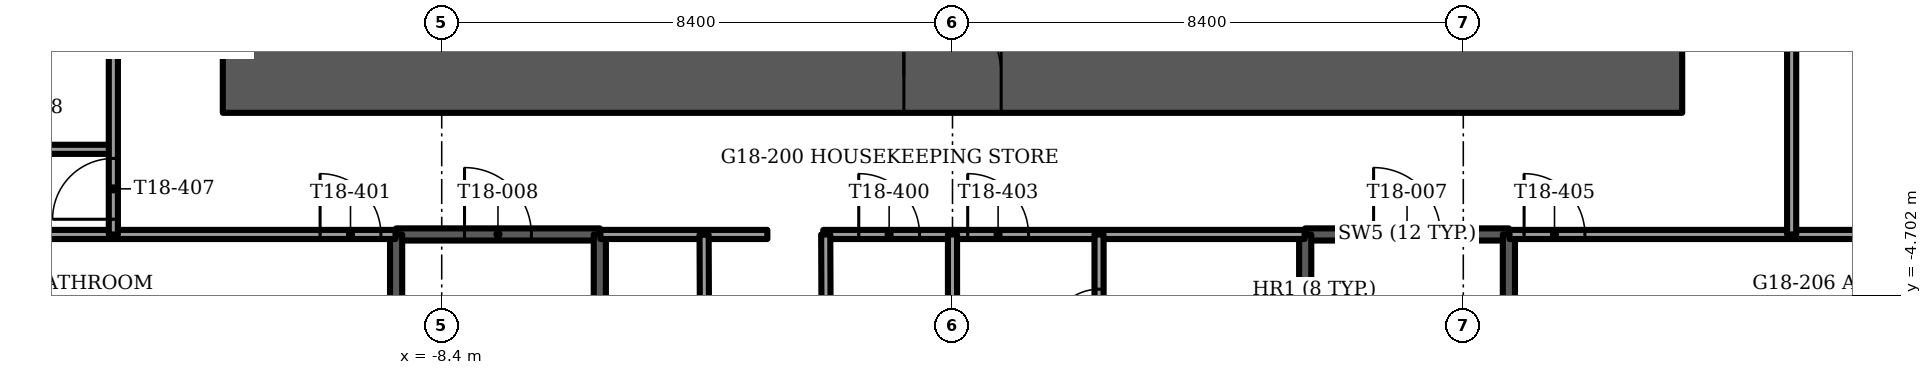
"""IFC4 building model, lengths in metres.
Left out: names, types, materials, properties, quantities, classifications, styles, units other than length and angle.
Written with IfcOpenShell. Run it as: python <this file> out.ifc"""

import sys

from ifc_helpers import new_model, si_unit, direction, frame, frame_2d, origin, place, context, subcontext, project, spatial, rectangle, extrude, element, fill, save


model = new_model("IFC4")
c1 = context("Model", 3, precision=1e-05, world=origin(), true_north=direction((0.0, 1.0)))
c2 = subcontext(c1, "Body", "Model", "MODEL_VIEW")
j1 = project(units=[si_unit("LENGTHUNIT", "METRE"), si_unit("PLANEANGLEUNIT", "RADIAN")], contexts=[c1])
p1 = place(None, origin())
s1 = spatial("IfcSite", under=j1, at=p1, CompositionType="ELEMENT")
p2 = place(p1, origin())
s2 = spatial("IfcBuilding", under=s1, at=p2, CompositionType="ELEMENT")
p3 = place(p2, frame((0.0, 0.0, 73.0)))
s3 = spatial("IfcBuildingStorey", under=s2, at=p3, CompositionType="ELEMENT", Elevation=73.0)
p4 = place(p3, frame((-12.0, -1.1, -0.3), z_axis=(0.0, 0.0, 1.0), x_axis=(1.0, 0.0, 0.0)))
e1 = element("IfcWall", 1, at=p4, inside=s3, PredefinedType="SHEAR", context=c2, shape_type="SweptSolid", body=[
    extrude(rectangle(XDim=24.0, YDim=1.2, at=frame_2d((12.0, 0.0))), origin(), (0.0, 0.0, 1.0), 3.75),
])
p5 = place(p4, frame((11.2, 0.0, 0.0)))
e2 = element("IfcOpeningElement", 2, at=p5, cuts=e1, PredefinedType="OPENING", context=c2, shape_type="SweptSolid", body=[
    extrude(rectangle(XDim=1.6, YDim=2.1, at=frame_2d((0.8, 1.05))), frame((0.0, 0.6, 0.0), z_axis=(0.0, -1.0, 0.0), x_axis=(1.0, 0.0, 0.0)), (0.0, 0.0, 1.0), 1.2),
])
p6 = place(p3, frame((-20.401, -1.514, 0.0), z_axis=(0.0, 0.0, 1.0), x_axis=(0.499991453095, -0.866030338286, 0.0)))
e3 = element("IfcWall", 3, at=p6, inside=s3, PredefinedType="SOLIDWALL", context=c2, shape_type="SweptSolid", body=[
    extrude(rectangle(XDim=11.444, YDim=0.15, at=frame_2d((5.722, 0.0))), origin(), (0.0, 0.0, 1.0), 3.45),
])
p7 = place(p6, frame((0.789, 0.0, 0.15)))
e4 = element("IfcOpeningElement", 4, at=p7, cuts=e3, PredefinedType="OPENING", context=c2, shape_type="SweptSolid", body=[
    extrude(rectangle(XDim=0.9, YDim=2.2, at=frame_2d((0.45, 1.1))), frame((0.0, 0.075, 0.0), z_axis=(0.0, -1.0, 0.0), x_axis=(1.0, 0.0, 0.0)), (0.0, 0.0, 1.0), 0.15),
])
p8 = place(p6, frame((2.889, 0.0, 0.15)))
e5 = element("IfcOpeningElement", 5, at=p8, cuts=e3, PredefinedType="OPENING", context=c2, shape_type="SweptSolid", body=[
    extrude(rectangle(XDim=1.5, YDim=2.2, at=frame_2d((0.75, 1.1))), frame((0.0, 0.075, 0.0), z_axis=(0.0, -1.0, 0.0), x_axis=(1.0, 0.0, 0.0)), (0.0, 0.0, 1.0), 0.15),
])
p9 = place(p6, frame((6.312, 0.0, 0.15)))
e6 = element("IfcOpeningElement", 6, at=p9, cuts=e3, PredefinedType="OPENING", context=c2, shape_type="SweptSolid", body=[
    extrude(rectangle(XDim=1.8, YDim=2.2, at=frame_2d((0.9, 1.1))), frame((0.0, 0.075, 0.0), z_axis=(0.0, -1.0, 0.0), x_axis=(1.0, 0.0, 0.0)), (0.0, 0.0, 1.0), 0.15),
])
p10 = place(p3, frame((14.679, -11.425, 0.0), z_axis=(0.0, 0.0, 1.0), x_axis=(0.499991453095, 0.866030338286, 0.0)))
e7 = element("IfcWall", 7, at=p10, inside=s3, PredefinedType="SOLIDWALL", context=c2, shape_type="SweptSolid", body=[
    extrude(rectangle(XDim=11.444, YDim=0.15, at=frame_2d((5.722, 0.0))), origin(), (0.0, 0.0, 1.0), 3.45),
])
p11 = place(p10, frame((3.632, 0.0, 0.15)))
e8 = element("IfcOpeningElement", 8, at=p11, cuts=e7, PredefinedType="OPENING", context=c2, shape_type="SweptSolid", body=[
    extrude(rectangle(XDim=1.5, YDim=2.2, at=frame_2d((0.75, 1.1))), frame((0.0, 0.075, 0.0), z_axis=(0.0, -1.0, 0.0), x_axis=(1.0, 0.0, 0.0)), (0.0, 0.0, 1.0), 0.15),
])
p12 = place(p10, frame((7.055, 0.0, 0.15)))
e9 = element("IfcOpeningElement", 9, at=p12, cuts=e7, PredefinedType="OPENING", context=c2, shape_type="SweptSolid", body=[
    extrude(rectangle(XDim=0.9, YDim=2.2, at=frame_2d((0.45, 1.1))), frame((0.0, 0.075, 0.0), z_axis=(0.0, -1.0, 0.0), x_axis=(1.0, 0.0, 0.0)), (0.0, 0.0, 1.0), 0.15),
])
p13 = place(p3, frame((5.8, -3.7, -0.3), z_axis=(0.0, 0.0, 1.0), x_axis=(1.0, 0.0, 0.0)))
e10 = element("IfcWall", 10, at=p13, inside=s3, PredefinedType="SOLIDWALL", context=c2, shape_type="SweptSolid", body=[
    extrude(rectangle(XDim=3.35, YDim=0.2, at=frame_2d((1.675, 0.0))), origin(), (0.0, 0.0, 1.0), 3.75),
])
p14 = place(p13, frame((1.125, 0.0, 0.0)))
e11 = element("IfcOpeningElement", 11, at=p14, cuts=e10, PredefinedType="OPENING", context=c2, shape_type="SweptSolid", body=[
    extrude(rectangle(XDim=1.1, YDim=2.1, at=frame_2d((0.55, 1.05))), frame((0.0, 0.1, 0.0), z_axis=(0.0, -1.0, 0.0), x_axis=(1.0, 0.0, 0.0)), (0.0, 0.0, 1.0), 0.2),
])
for number, where, z_axis, x_axis in (
    (12, (5.8, -3.7, -0.3), (0.0, 0.0, 1.0), (0.0, -1.0, 0.0)),
    (13, (9.15, -3.7, -0.3), (0.0, 0.0, 1.0), (0.0, -1.0, 0.0)),
):
    element("IfcWall", number, at=place(p3, frame(where, z_axis=z_axis, x_axis=x_axis)), inside=s3, PredefinedType="SOLIDWALL", context=c2, shape_type="SweptSolid", body=[
        extrude(rectangle(XDim=7.7, YDim=0.2, at=frame_2d((3.85, 0.0))), origin(), (0.0, 0.0, 1.0), 3.75),
    ])
p15 = place(p3, frame((-9.15, -3.7, -0.3), z_axis=(0.0, 0.0, 1.0), x_axis=(1.0, 0.0, 0.0)))
e14 = element("IfcWall", 14, at=p15, inside=s3, PredefinedType="SOLIDWALL", context=c2, shape_type="SweptSolid", body=[
    extrude(rectangle(XDim=3.35, YDim=0.2, at=frame_2d((1.675, 0.0))), origin(), (0.0, 0.0, 1.0), 3.75),
])
p16 = place(p15, frame((1.125, 0.0, 0.0)))
e15 = element("IfcOpeningElement", 15, at=p16, cuts=e14, PredefinedType="OPENING", context=c2, shape_type="SweptSolid", body=[
    extrude(rectangle(XDim=1.1, YDim=2.1, at=frame_2d((0.55, 1.05))), frame((0.0, 0.1, 0.0), z_axis=(0.0, -1.0, 0.0), x_axis=(1.0, 0.0, 0.0)), (0.0, 0.0, 1.0), 0.2),
])
for number, where, z_axis, x_axis in (
    (16, (-9.15, -3.7, -0.3), (0.0, 0.0, 1.0), (0.0, -1.0, 0.0)),
    (17, (-5.8, -3.7, -0.3), (0.0, 0.0, 1.0), (0.0, -1.0, 0.0)),
):
    element("IfcWall", number, at=place(p3, frame(where, z_axis=z_axis, x_axis=x_axis)), inside=s3, PredefinedType="SOLIDWALL", context=c2, shape_type="SweptSolid", body=[
        extrude(rectangle(XDim=7.7, YDim=0.2, at=frame_2d((3.85, 0.0))), origin(), (0.0, 0.0, 1.0), 3.75),
    ])
p17 = place(p3, frame((-19.191, -3.7, 0.0), z_axis=(0.0, 0.0, 1.0), x_axis=(1.0, 0.0, 0.0)))
e18 = element("IfcWall", 18, at=p17, inside=s3, PredefinedType="PARTITIONING", context=c2, shape_type="SweptSolid", body=[
    extrude(rectangle(XDim=10.031, YDim=0.15, at=frame_2d((5.016, 0.0))), origin(), (0.0, 0.0, 1.0), 3.45),
])
p18 = place(p17, frame((8.791, 0.0, 0.0)))
e19 = element("IfcOpeningElement", 19, at=p18, cuts=e18, PredefinedType="OPENING", context=c2, shape_type="SweptSolid", body=[
    extrude(rectangle(XDim=1.0, YDim=2.1, at=frame_2d((0.5, 1.05))), frame((0.0, 0.075, 0.0), z_axis=(0.0, -1.0, 0.0), x_axis=(1.0, 0.0, 0.0)), (0.0, 0.0, 1.0), 0.15),
])
p19 = place(p3, frame((-5.79, -3.7, 0.0), z_axis=(0.0, 0.0, 1.0), x_axis=(1.0, 0.0, 0.0)))
e20 = element("IfcWall", 20, at=p19, inside=s3, PredefinedType="PARTITIONING", context=c2, shape_type="SweptSolid", body=[
    extrude(rectangle(XDim=2.745, YDim=0.15, at=frame_2d((1.373, 0.0))), origin(), (0.0, 0.0, 1.0), 3.45),
])
p20 = place(p3, frame((-2.125, -3.7, 0.0), z_axis=(0.0, 0.0, 1.0), x_axis=(1.0, 0.0, 0.0)))
e21 = element("IfcWall", 21, at=p20, inside=s3, PredefinedType="PARTITIONING", context=c2, shape_type="SweptSolid", body=[
    extrude(rectangle(XDim=7.915, YDim=0.15, at=frame_2d((3.958, 0.0))), origin(), (0.0, 0.0, 1.0), 3.45),
])
p21 = place(p20, frame((0.583, 0.0, 0.0)))
e22 = element("IfcOpeningElement", 22, at=p21, cuts=e21, PredefinedType="OPENING", context=c2, shape_type="SweptSolid", body=[
    extrude(rectangle(XDim=1.0, YDim=2.1, at=frame_2d((0.5, 1.05))), frame((0.0, 0.075, 0.0), z_axis=(0.0, -1.0, 0.0), x_axis=(1.0, 0.0, 0.0)), (0.0, 0.0, 1.0), 0.15),
])
p22 = place(p20, frame((2.375, 0.0, 0.0)))
e23 = element("IfcOpeningElement", 23, at=p22, cuts=e21, PredefinedType="OPENING", context=c2, shape_type="SweptSolid", body=[
    extrude(rectangle(XDim=1.0, YDim=2.1, at=frame_2d((0.5, 1.05))), frame((0.0, 0.075, 0.0), z_axis=(0.0, -1.0, 0.0), x_axis=(1.0, 0.0, 0.0)), (0.0, 0.0, 1.0), 0.15),
])
p23 = place(p3, frame((9.16, -3.7, 0.0), z_axis=(0.0, 0.0, 1.0), x_axis=(1.0, 0.0, 0.0)))
e24 = element("IfcWall", 24, at=p23, inside=s3, PredefinedType="PARTITIONING", context=c2, shape_type="SweptSolid", body=[
    extrude(rectangle(XDim=10.031, YDim=0.15, at=frame_2d((5.016, 0.0))), origin(), (0.0, 0.0, 1.0), 3.45),
])
p24 = place(p23, frame((0.24, 0.0, 0.0)))
e25 = element("IfcOpeningElement", 25, at=p24, cuts=e24, PredefinedType="OPENING", context=c2, shape_type="SweptSolid", body=[
    extrude(rectangle(XDim=1.0, YDim=2.1, at=frame_2d((0.5, 1.05))), frame((0.0, 0.075, 0.0), z_axis=(0.0, -1.0, 0.0), x_axis=(1.0, 0.0, 0.0)), (0.0, 0.0, 1.0), 0.15),
])
p25 = place(p3, frame((-16.8, -2.3, 0.0), z_axis=(0.0, 0.0, 1.0), x_axis=(1.0, 0.0, 0.0)))
e26 = element("IfcWall", 26, at=p25, inside=s3, PredefinedType="PARTITIONING", context=c2, shape_type="SweptSolid", body=[
    extrude(rectangle(XDim=3.0, YDim=0.15, at=frame_2d((1.5, 0.0))), origin(), (0.0, 0.0, 1.0), 3.45),
])
p26 = place(p25, frame((1.05, 0.0, 0.0)))
e27 = element("IfcOpeningElement", 27, at=p26, cuts=e26, PredefinedType="OPENING", context=c2, shape_type="SweptSolid", body=[
    extrude(rectangle(XDim=0.9, YDim=2.1, at=frame_2d((0.45, 1.05))), frame((0.0, 0.075, 0.0), z_axis=(0.0, -1.0, 0.0), x_axis=(1.0, 0.0, 0.0)), (0.0, 0.0, 1.0), 0.15),
])
p27 = place(p3, frame((13.8, -3.7, 0.0), z_axis=(0.0, 0.0, 1.0), x_axis=(0.0, 1.0, 0.0)))
e28 = element("IfcWall", 28, at=p27, inside=s3, PredefinedType="PARTITIONING", context=c2, shape_type="SweptSolid", body=[
    extrude(rectangle(XDim=11.415, YDim=0.15, at=frame_2d((5.708, 0.0))), origin(), (0.0, 0.0, 1.0), 3.45),
])
p28 = place(p27, frame((4.469, 0.0, 0.0)))
e29 = element("IfcOpeningElement", 29, at=p28, cuts=e28, PredefinedType="OPENING", context=c2, shape_type="SweptSolid", body=[
    extrude(rectangle(XDim=1.0, YDim=2.1, at=frame_2d((0.5, 1.05))), frame((0.0, 0.075, 0.0), z_axis=(0.0, -1.0, 0.0), x_axis=(1.0, 0.0, 0.0)), (0.0, 0.0, 1.0), 0.15),
])
p29 = place(p27, frame((9.407, 0.0, 0.0)))
e30 = element("IfcOpeningElement", 30, at=p29, cuts=e28, PredefinedType="OPENING", context=c2, shape_type="SweptSolid", body=[
    extrude(rectangle(XDim=1.0, YDim=2.1, at=frame_2d((0.5, 1.05))), frame((0.0, 0.075, 0.0), z_axis=(0.0, -1.0, 0.0), x_axis=(1.0, 0.0, 0.0)), (0.0, 0.0, 1.0), 0.15),
])
p30 = place(p3, frame((2.41, -6.3, 0.0), z_axis=(0.0, 0.0, 1.0), x_axis=(0.0, 1.0, 0.0)))
e31 = element("IfcWall", 31, at=p30, inside=s3, PredefinedType="PARTITIONING", context=c2, shape_type="SweptSolid", body=[
    extrude(rectangle(XDim=2.6, YDim=0.15, at=frame_2d((1.3, 0.0))), origin(), (0.0, 0.0, 1.0), 3.45),
])
p31 = place(p30, frame((0.9, 0.0, 0.0)))
e32 = element("IfcOpeningElement", 32, at=p31, cuts=e31, PredefinedType="OPENING", context=c2, shape_type="SweptSolid", body=[
    extrude(rectangle(XDim=0.8, YDim=2.1, at=frame_2d((0.4, 1.05))), frame((0.0, 0.075, 0.0), z_axis=(0.0, -1.0, 0.0), x_axis=(1.0, 0.0, 0.0)), (0.0, 0.0, 1.0), 0.15),
])
p32 = place(p3, frame((0.0, -9.68, 0.0), z_axis=(0.0, 0.0, 1.0), x_axis=(0.0, 1.0, 0.0)))
e33 = element("IfcWall", 33, at=p32, inside=s3, PredefinedType="PARTITIONING", context=c2, shape_type="SweptSolid", body=[
    extrude(rectangle(XDim=5.98, YDim=0.15, at=frame_2d((2.99, 0.0))), origin(), (0.0, 0.0, 1.0), 3.45),
])
p33 = place(p3, frame((-13.8, -3.7, 0.0), z_axis=(0.0, 0.0, 1.0), x_axis=(0.0, 1.0, 0.0)))
e34 = element("IfcWall", 34, at=p33, inside=s3, PredefinedType="PARTITIONING", context=c2, shape_type="SweptSolid", body=[
    extrude(rectangle(XDim=11.415, YDim=0.15, at=frame_2d((5.708, 0.0))), origin(), (0.0, 0.0, 1.0), 3.45),
])
p34 = place(p33, frame((0.25, 0.0, 0.0)))
e35 = element("IfcOpeningElement", 35, at=p34, cuts=e34, PredefinedType="OPENING", context=c2, shape_type="SweptSolid", body=[
    extrude(rectangle(XDim=1.0, YDim=2.1, at=frame_2d((0.5, 1.05))), frame((0.0, 0.075, 0.0), z_axis=(0.0, -1.0, 0.0), x_axis=(1.0, 0.0, 0.0)), (0.0, 0.0, 1.0), 0.15),
])
p35 = place(p33, frame((7.308, 0.0, 0.0)))
e36 = element("IfcOpeningElement", 36, at=p35, cuts=e34, PredefinedType="OPENING", context=c2, shape_type="SweptSolid", body=[
    extrude(rectangle(XDim=1.0, YDim=2.1, at=frame_2d((0.5, 1.05))), frame((0.0, 0.075, 0.0), z_axis=(0.0, -1.0, 0.0), x_axis=(1.0, 0.0, 0.0)), (0.0, 0.0, 1.0), 0.15),
])
p36 = place(p3, frame((-2.061, -9.54, 0.0), z_axis=(0.0, 0.0, 1.0), x_axis=(-0.004096784315, 0.999991608144, 0.0)))
e37 = element("IfcWall", 37, at=p36, inside=s3, PredefinedType="PARTITIONING", context=c2, shape_type="SweptSolid", body=[
    extrude(rectangle(XDim=5.84, YDim=0.15, at=frame_2d((2.92, 0.0))), origin(), (0.0, 0.0, 1.0), 3.45),
])
p37 = place(p3, frame((-4.061, -9.54, 0.0), z_axis=(0.0, 0.0, 1.0), x_axis=(-0.004100383939, 0.99999159339, 0.0)))
e38 = element("IfcWall", 38, at=p37, inside=s3, PredefinedType="PARTITIONING", context=c2, shape_type="SweptSolid", body=[
    extrude(rectangle(XDim=5.835, YDim=0.15, at=frame_2d((2.917, 0.0))), origin(), (0.0, 0.0, 1.0), 3.45),
])
p38 = place(p5, origin())
e39 = element("IfcDoor", 39, at=p38, inside=s3, OperationType="DOUBLE_DOOR_SINGLE_SWING", PredefinedType="DOOR", context=c2, shape_type="SweptSolid", body=[
    extrude(rectangle(XDim=1.6, YDim=2.1, at=frame_2d((0.8, 1.05))), frame((0.0, 0.025, 0.0), z_axis=(0.0, -1.0, 0.0), x_axis=(1.0, 0.0, 0.0)), (0.0, 0.0, 1.0), 0.05),
])
fill(e2, e39)
p39 = place(p14, origin())
e40 = element("IfcDoor", 40, at=p39, inside=s3, OperationType="SINGLE_SWING_LEFT", PredefinedType="DOOR", context=c2, shape_type="SweptSolid", body=[
    extrude(rectangle(XDim=1.1, YDim=2.1, at=frame_2d((0.55, 1.05))), frame((0.0, 0.025, 0.0), z_axis=(0.0, -1.0, 0.0), x_axis=(1.0, 0.0, 0.0)), (0.0, 0.0, 1.0), 0.05),
])
fill(e11, e40)
p40 = place(p16, origin())
e41 = element("IfcDoor", 41, at=p40, inside=s3, OperationType="SINGLE_SWING_LEFT", PredefinedType="DOOR", context=c2, shape_type="SweptSolid", body=[
    extrude(rectangle(XDim=1.1, YDim=2.1, at=frame_2d((0.55, 1.05))), frame((0.0, 0.025, 0.0), z_axis=(0.0, -1.0, 0.0), x_axis=(1.0, 0.0, 0.0)), (0.0, 0.0, 1.0), 0.05),
])
fill(e15, e41)
p41 = place(p21, origin())
e42 = element("IfcDoor", 42, at=p41, inside=s3, OperationType="SINGLE_SWING_RIGHT", PredefinedType="DOOR", context=c2, shape_type="SweptSolid", body=[
    extrude(rectangle(XDim=1.0, YDim=2.1, at=frame_2d((0.5, 1.05))), frame((0.0, 0.025, 0.0), z_axis=(0.0, -1.0, 0.0), x_axis=(1.0, 0.0, 0.0)), (0.0, 0.0, 1.0), 0.05),
])
fill(e22, e42)
p42 = place(p18, origin())
e43 = element("IfcDoor", 43, at=p42, inside=s3, OperationType="SINGLE_SWING_RIGHT", PredefinedType="DOOR", context=c2, shape_type="SweptSolid", body=[
    extrude(rectangle(XDim=1.0, YDim=2.1, at=frame_2d((0.5, 1.05))), frame((0.0, 0.025, 0.0), z_axis=(0.0, -1.0, 0.0), x_axis=(1.0, 0.0, 0.0)), (0.0, 0.0, 1.0), 0.05),
])
fill(e19, e43)
p43 = place(p22, origin())
e44 = element("IfcDoor", 44, at=p43, inside=s3, OperationType="SINGLE_SWING_LEFT", PredefinedType="DOOR", context=c2, shape_type="SweptSolid", body=[
    extrude(rectangle(XDim=1.0, YDim=2.1, at=frame_2d((0.5, 1.05))), frame((0.0, 0.025, 0.0), z_axis=(0.0, -1.0, 0.0), x_axis=(1.0, 0.0, 0.0)), (0.0, 0.0, 1.0), 0.05),
])
fill(e23, e44)
p44 = place(p31, origin())
e45 = element("IfcDoor", 45, at=p44, inside=s3, OperationType="SINGLE_SWING_RIGHT", PredefinedType="DOOR", context=c2, shape_type="SweptSolid", body=[
    extrude(rectangle(XDim=0.8, YDim=2.1, at=frame_2d((0.4, 1.05))), frame((0.0, 0.025, 0.0), z_axis=(0.0, -1.0, 0.0), x_axis=(1.0, 0.0, 0.0)), (0.0, 0.0, 1.0), 0.05),
])
fill(e32, e45)
p45 = place(p24, origin())
e46 = element("IfcDoor", 46, at=p45, inside=s3, OperationType="SINGLE_SWING_LEFT", PredefinedType="DOOR", context=c2, shape_type="SweptSolid", body=[
    extrude(rectangle(XDim=1.0, YDim=2.1, at=frame_2d((0.5, 1.05))), frame((0.0, 0.025, 0.0), z_axis=(0.0, -1.0, 0.0), x_axis=(1.0, 0.0, 0.0)), (0.0, 0.0, 1.0), 0.05),
])
fill(e25, e46)
p46 = place(p34, origin())
e47 = element("IfcDoor", 47, at=p46, inside=s3, OperationType="SINGLE_SWING_LEFT", PredefinedType="DOOR", context=c2, shape_type="SweptSolid", body=[
    extrude(rectangle(XDim=1.0, YDim=2.1, at=frame_2d((0.5, 1.05))), frame((0.0, 0.025, 0.0), z_axis=(0.0, -1.0, 0.0), x_axis=(1.0, 0.0, 0.0)), (0.0, 0.0, 1.0), 0.05),
])
fill(e35, e47)
save(model, sys.argv[1])
